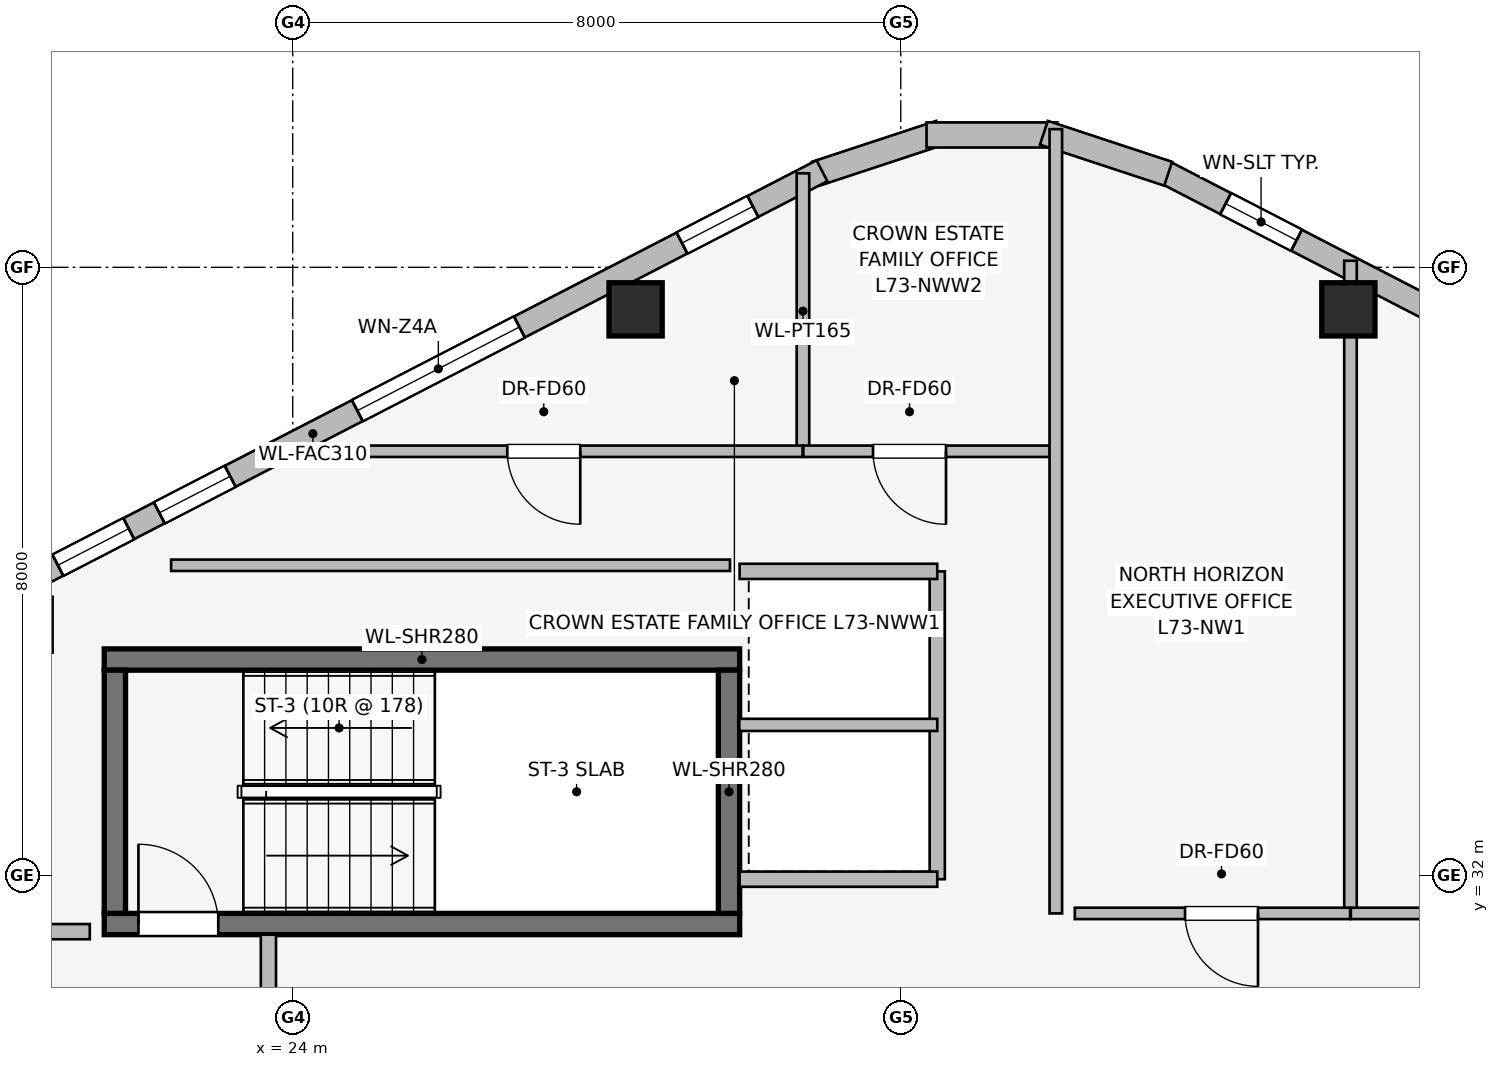
"""IFC4 building model, lengths in metres.
Left out: names, types, materials, properties, quantities, classifications, styles, units other than length and angle.
Written with IfcOpenShell. Run it as: python <this file> out.ifc"""

import sys

from ifc_helpers import new_model, si_unit, direction, frame, frame_2d, origin, origin_2d, place, context, subcontext, project, spatial, rectangle, extrude, element, fill, save


model = new_model("IFC4")
c1 = context("Model", 3, precision=1e-05, world=origin(), true_north=direction((0.0, 1.0)))
c2 = subcontext(c1, "Body", "Model", "MODEL_VIEW")
j1 = project(units=[si_unit("LENGTHUNIT", "METRE"), si_unit("PLANEANGLEUNIT", "RADIAN")], contexts=[c1])
p1 = place(None, origin())
s1 = spatial("IfcSite", under=j1, at=p1, CompositionType="ELEMENT")
p2 = place(p1, origin())
s2 = spatial("IfcBuilding", under=s1, at=p2, CompositionType="ELEMENT")
p3 = place(p2, frame((0.0, 0.0, 266.75)))
s3 = spatial("IfcBuildingStorey", under=s2, at=p3, CompositionType="ELEMENT", Elevation=266.75)
p4 = place(p3, frame((21.52, 31.36, 0.0), z_axis=(0.0, 0.0, 1.0), x_axis=(1.0, 0.0, 0.0)))
e1 = element("IfcWall", 1, at=p4, inside=s3, PredefinedType="SHEAR", context=c2, shape_type="SweptSolid", body=[
    extrude(rectangle(XDim=8.36, YDim=0.28, at=frame_2d((4.18, 0.0))), origin(), (0.0, 0.0, 1.0), 3.55),
])
p5 = place(p4, frame((0.45, 0.0, 0.0)))
e2 = element("IfcOpeningElement", 2, at=p5, cuts=e1, PredefinedType="OPENING", context=c2, shape_type="SweptSolid", body=[
    extrude(rectangle(XDim=1.05, YDim=2.0, at=frame_2d((0.525, 1.0))), frame((0.0, 0.15, 0.0), z_axis=(0.0, -1.0, 0.0), x_axis=(1.0, 0.0, 0.0)), (0.0, 0.0, 1.0), 0.3),
])
p6 = place(p3, frame((29.88, 34.84, 0.0), z_axis=(0.0, 0.0, 1.0), x_axis=(-1.0, 0.0, 0.0)))
e3 = element("IfcWall", 3, at=p6, inside=s3, PredefinedType="SHEAR", context=c2, shape_type="SweptSolid", body=[
    extrude(rectangle(XDim=8.36, YDim=0.28, at=frame_2d((4.18, 0.0))), origin(), (0.0, 0.0, 1.0), 3.55),
])
for number, where, z_axis, x_axis in (
    (4, (21.66, 34.7, 0.0), (0.0, 0.0, 1.0), (0.0, -1.0, 0.0)),
    (5, (29.74, 31.5, 0.0), (0.0, 0.0, 1.0), (0.0, 1.0, 0.0)),
):
    element("IfcWall", number, at=place(p3, frame(where, z_axis=z_axis, x_axis=x_axis)), inside=s3, PredefinedType="SHEAR", context=c2, shape_type="SweptSolid", body=[
        extrude(rectangle(XDim=3.2, YDim=0.28, at=frame_2d((1.6, 0.0))), origin(), (0.0, 0.0, 1.0), 3.55),
    ])
for number, where, z_axis, x_axis in (
    (6, (37.889, 39.447, 0.0), (0.0, 0.0, 1.0), (1.0, 0.0, 0.0)),
    (7, (28.511, 39.447, 0.0), (0.0, 0.0, 1.0), (1.0, 0.0, 0.0)),
):
    element("IfcColumn", number, at=place(p3, frame(where, z_axis=z_axis, x_axis=x_axis)), inside=s3, PredefinedType="COLUMN", context=c2, shape_type="SweptSolid", body=[
        extrude(rectangle(XDim=0.7, YDim=0.7, at=origin_2d()), origin(), (0.0, 0.0, 1.0), 3.55),
    ])
p7 = place(p3, frame((35.437, 41.27, 0.0), z_axis=(0.0, 0.0, 1.0), x_axis=(0.888581481622, -0.458718814218, 0.0)))
e8 = element("IfcWall", 8, at=p7, inside=s3, PredefinedType="STANDARD", context=c2, shape_type="SweptSolid", body=[
    extrude(rectangle(XDim=15.077, YDim=0.31, at=frame_2d((7.539, 0.0))), origin(), (0.0, 0.0, 1.0), 3.24),
])
p8 = place(p7, frame((0.942, 0.0, 0.75)))
e9 = element("IfcOpeningElement", 9, at=p8, cuts=e8, PredefinedType="OPENING", context=c2, shape_type="SweptSolid", body=[
    extrude(rectangle(XDim=1.05, YDim=1.4, at=frame_2d((0.525, 0.7))), frame((0.0, 0.165, 0.0), z_axis=(0.0, -1.0, 0.0), x_axis=(1.0, 0.0, 0.0)), (0.0, 0.0, 1.0), 0.33),
])
p9 = place(p7, frame((4.344, 0.0, 0.75)))
e10 = element("IfcOpeningElement", 10, at=p9, cuts=e8, PredefinedType="OPENING", context=c2, shape_type="SweptSolid", body=[
    extrude(rectangle(XDim=1.05, YDim=1.4, at=frame_2d((0.525, 0.7))), frame((0.0, 0.165, 0.0), z_axis=(0.0, -1.0, 0.0), x_axis=(1.0, 0.0, 0.0)), (0.0, 0.0, 1.0), 0.33),
])
p10 = place(p7, frame((7.013, 0.0, 0.75)))
e11 = element("IfcOpeningElement", 11, at=p10, cuts=e8, PredefinedType="OPENING", context=c2, shape_type="SweptSolid", body=[
    extrude(rectangle(XDim=1.05, YDim=1.4, at=frame_2d((0.525, 0.7))), frame((0.0, 0.165, 0.0), z_axis=(0.0, -1.0, 0.0), x_axis=(1.0, 0.0, 0.0)), (0.0, 0.0, 1.0), 0.33),
])
p11 = place(p7, frame((9.681, 0.0, 0.75)))
e12 = element("IfcOpeningElement", 12, at=p11, cuts=e8, PredefinedType="OPENING", context=c2, shape_type="SweptSolid", body=[
    extrude(rectangle(XDim=1.05, YDim=1.4, at=frame_2d((0.525, 0.7))), frame((0.0, 0.165, 0.0), z_axis=(0.0, -1.0, 0.0), x_axis=(1.0, 0.0, 0.0)), (0.0, 0.0, 1.0), 0.33),
])
p12 = place(p7, frame((13.029, 0.0, 0.75)))
e13 = element("IfcOpeningElement", 13, at=p12, cuts=e8, PredefinedType="OPENING", context=c2, shape_type="SweptSolid", body=[
    extrude(rectangle(XDim=1.05, YDim=1.4, at=frame_2d((0.525, 0.7))), frame((0.0, 0.165, 0.0), z_axis=(0.0, -1.0, 0.0), x_axis=(1.0, 0.0, 0.0)), (0.0, 0.0, 1.0), 0.33),
])
p13 = place(p3, frame((30.882, 41.231, 0.0), z_axis=(0.0, 0.0, 1.0), x_axis=(0.949713440491, 0.313120393699, 0.0)))
e14 = element("IfcWall", 14, at=p13, inside=s3, PredefinedType="STANDARD", context=c2, shape_type="SweptSolid", body=[
    extrude(rectangle(XDim=1.722, YDim=0.33, at=frame_2d((0.861, 0.0))), origin(), (0.0, 0.0, 1.0), 3.24),
])
p14 = place(p3, frame((32.339, 41.741, 0.0), z_axis=(0.0, 0.0, 1.0), x_axis=(1.0, 0.0, 0.0)))
e15 = element("IfcWall", 15, at=p14, inside=s3, PredefinedType="STANDARD", context=c2, shape_type="SweptSolid", body=[
    extrude(rectangle(XDim=1.722, YDim=0.33, at=frame_2d((0.861, 0.0))), origin(), (0.0, 0.0, 1.0), 3.24),
])
p15 = place(p3, frame((33.883, 41.77, 0.0), z_axis=(0.0, 0.0, 1.0), x_axis=(0.949713440491, -0.313120393699, 0.0)))
e16 = element("IfcWall", 16, at=p15, inside=s3, PredefinedType="STANDARD", context=c2, shape_type="SweptSolid", body=[
    extrude(rectangle(XDim=1.722, YDim=0.33, at=frame_2d((0.861, 0.0))), origin(), (0.0, 0.0, 1.0), 3.24),
])
p16 = place(p3, frame((17.566, 34.354, 0.0), z_axis=(0.0, 0.0, 1.0), x_axis=(0.888581481622, 0.458718814218, 0.0)))
e17 = element("IfcWall", 17, at=p16, inside=s3, PredefinedType="STANDARD", context=c2, shape_type="SweptSolid", body=[
    extrude(rectangle(XDim=15.077, YDim=0.31, at=frame_2d((7.539, 0.0))), origin(), (0.0, 0.0, 1.0), 3.24),
])
p17 = place(p16, frame((0.998, 0.0, 0.75)))
e18 = element("IfcOpeningElement", 18, at=p17, cuts=e17, PredefinedType="OPENING", context=c2, shape_type="SweptSolid", body=[
    extrude(rectangle(XDim=1.05, YDim=1.4, at=frame_2d((0.525, 0.7))), frame((0.0, 0.165, 0.0), z_axis=(0.0, -1.0, 0.0), x_axis=(1.0, 0.0, 0.0)), (0.0, 0.0, 1.0), 0.33),
])
p18 = place(p16, frame((3.763, 0.0, 0.75)))
e19 = element("IfcOpeningElement", 19, at=p18, cuts=e17, PredefinedType="OPENING", context=c2, shape_type="SweptSolid", body=[
    extrude(rectangle(XDim=1.05, YDim=1.4, at=frame_2d((0.525, 0.7))), frame((0.0, 0.165, 0.0), z_axis=(0.0, -1.0, 0.0), x_axis=(1.0, 0.0, 0.0)), (0.0, 0.0, 1.0), 0.33),
])
p19 = place(p16, frame((5.265, 0.0, 0.75)))
e20 = element("IfcOpeningElement", 20, at=p19, cuts=e17, PredefinedType="OPENING", context=c2, shape_type="SweptSolid", body=[
    extrude(rectangle(XDim=1.05, YDim=1.4, at=frame_2d((0.525, 0.7))), frame((0.0, 0.165, 0.0), z_axis=(0.0, -1.0, 0.0), x_axis=(1.0, 0.0, 0.0)), (0.0, 0.0, 1.0), 0.33),
])
p20 = place(p16, frame((8.197, 0.0, 0.75)))
e21 = element("IfcOpeningElement", 21, at=p20, cuts=e17, PredefinedType="OPENING", context=c2, shape_type="SweptSolid", body=[
    extrude(rectangle(XDim=2.4, YDim=1.6, at=frame_2d((1.2, 0.8))), frame((0.0, 0.165, 0.0), z_axis=(0.0, -1.0, 0.0), x_axis=(1.0, 0.0, 0.0)), (0.0, 0.0, 1.0), 0.33),
])
p21 = place(p16, frame((13.004, 0.0, 0.75)))
e22 = element("IfcOpeningElement", 22, at=p21, cuts=e17, PredefinedType="OPENING", context=c2, shape_type="SweptSolid", body=[
    extrude(rectangle(XDim=1.05, YDim=1.4, at=frame_2d((0.525, 0.7))), frame((0.0, 0.165, 0.0), z_axis=(0.0, -1.0, 0.0), x_axis=(1.0, 0.0, 0.0)), (0.0, 0.0, 1.0), 0.33),
])
p22 = place(p3, frame((23.68, 25.68, 0.0), z_axis=(0.0, 0.0, 1.0), x_axis=(0.0, 1.0, 0.0)))
e23 = element("IfcWall", 23, at=p22, inside=s3, PredefinedType="PARTITIONING", context=c2, shape_type="SweptSolid", body=[
    extrude(rectangle(XDim=5.54, YDim=0.2, at=frame_2d((2.77, 0.0))), origin(), (0.0, 0.0, 1.0), 3.24),
])
p23 = place(p22, frame((1.8, 0.0, 0.0)))
e24 = element("IfcOpeningElement", 24, at=p23, cuts=e23, PredefinedType="OPENING", context=c2, shape_type="SweptSolid", body=[
    extrude(rectangle(XDim=1.05, YDim=2.0, at=frame_2d((0.525, 1.0))), frame((0.0, 0.11, 0.0), z_axis=(0.0, -1.0, 0.0), x_axis=(1.0, 0.0, 0.0)), (0.0, 0.0, 1.0), 0.22),
])
p24 = place(p3, frame((21.33, 31.26, 0.0), z_axis=(0.0, 0.0, 1.0), x_axis=(-1.0, 0.0, 0.0)))
e25 = element("IfcWall", 25, at=p24, inside=s3, PredefinedType="PARTITIONING", context=c2, shape_type="SweptSolid", body=[
    extrude(rectangle(XDim=1.68, YDim=0.2, at=frame_2d((0.84, 0.0))), origin(), (0.0, 0.0, 1.0), 3.24),
])
p25 = place(p3, frame((32.48, 31.95, 0.0), z_axis=(0.0, 0.0, 1.0), x_axis=(0.0, 1.0, 0.0)))
e26 = element("IfcWall", 26, at=p25, inside=s3, PredefinedType="PARTITIONING", context=c2, shape_type="SweptSolid", body=[
    extrude(rectangle(XDim=4.05, YDim=0.2, at=frame_2d((2.025, 0.0))), origin(), (0.0, 0.0, 1.0), 3.24),
])
for number, where, z_axis, x_axis in (
    (27, (29.88, 36.0, 0.0), (0.0, 0.0, 1.0), (1.0, 0.0, 0.0)),
    (28, (32.48, 31.95, 0.0), (0.0, 0.0, 1.0), (-1.0, 0.0, 0.0)),
):
    element("IfcWall", number, at=place(p3, frame(where, z_axis=z_axis, x_axis=x_axis)), inside=s3, PredefinedType="PARTITIONING", context=c2, shape_type="SweptSolid", body=[
        extrude(rectangle(XDim=2.6, YDim=0.2, at=frame_2d((1.3, 0.0))), origin(), (0.0, 0.0, 1.0), 3.24),
    ])
p26 = place(p3, frame((29.875, 33.98, 0.0), z_axis=(0.0, 0.0, 1.0), x_axis=(1.0, 0.0, 0.0)))
e29 = element("IfcWall", 29, at=p26, inside=s3, PredefinedType="PARTITIONING", context=c2, shape_type="SweptSolid", body=[
    extrude(rectangle(XDim=2.605, YDim=0.16, at=frame_2d((1.302, 0.0))), origin(), (0.0, 0.0, 1.0), 3.24),
])
p27 = place(p3, frame((30.713, 37.61, 0.0), z_axis=(0.0, 0.0, 1.0), x_axis=(0.0, 1.0, 0.0)))
e30 = element("IfcWall", 30, at=p27, inside=s3, PredefinedType="PARTITIONING", context=c2, shape_type="SweptSolid", body=[
    extrude(rectangle(XDim=3.627, YDim=0.165, at=frame_2d((1.813, 0.0))), origin(), (0.0, 0.0, 1.0), 3.24),
])
p28 = place(p3, frame((30.708, 37.58, 0.0), z_axis=(0.0, 0.0, 1.0), x_axis=(-1.0, 0.0, 0.0)))
e31 = element("IfcWall", 31, at=p28, inside=s3, PredefinedType="PARTITIONING", context=c2, shape_type="SweptSolid", body=[
    extrude(rectangle(XDim=7.046, YDim=0.15, at=frame_2d((3.523, 0.0))), origin(), (0.0, 0.0, 1.0), 2.632),
])
p29 = place(p28, frame((2.925, 0.0, 0.0)))
e32 = element("IfcOpeningElement", 32, at=p29, cuts=e31, PredefinedType="OPENING", context=c2, shape_type="SweptSolid", body=[
    extrude(rectangle(XDim=0.96, YDim=2.0, at=frame_2d((0.48, 1.0))), frame((0.0, 0.085, 0.0), z_axis=(0.0, -1.0, 0.0), x_axis=(1.0, 0.0, 0.0)), (0.0, 0.0, 1.0), 0.17),
])
p30 = place(p3, frame((33.962, 37.58, 0.0), z_axis=(0.0, 0.0, 1.0), x_axis=(-1.0, 0.0, 0.0)))
e33 = element("IfcWall", 33, at=p30, inside=s3, PredefinedType="PARTITIONING", context=c2, shape_type="SweptSolid", body=[
    extrude(rectangle(XDim=3.244, YDim=0.15, at=frame_2d((1.622, 0.0))), origin(), (0.0, 0.0, 1.0), 3.24),
])
p31 = place(p30, frame((1.367, 0.0, 0.0)))
e34 = element("IfcOpeningElement", 34, at=p31, cuts=e33, PredefinedType="OPENING", context=c2, shape_type="SweptSolid", body=[
    extrude(rectangle(XDim=0.96, YDim=2.0, at=frame_2d((0.48, 1.0))), frame((0.0, 0.085, 0.0), z_axis=(0.0, -1.0, 0.0), x_axis=(1.0, 0.0, 0.0)), (0.0, 0.0, 1.0), 0.17),
])
p32 = place(p3, frame((34.04, 31.5, 0.0), z_axis=(0.0, 0.0, 1.0), x_axis=(0.0, 1.0, 0.0)))
e35 = element("IfcWall", 35, at=p32, inside=s3, PredefinedType="PARTITIONING", context=c2, shape_type="SweptSolid", body=[
    extrude(rectangle(XDim=10.318, YDim=0.165, at=frame_2d((5.159, 0.0))), origin(), (0.0, 0.0, 1.0), 3.24),
])
p33 = place(p3, frame((37.917, 31.51, 0.0), z_axis=(0.0, 0.0, 1.0), x_axis=(0.0, 1.0, 0.0)))
e36 = element("IfcWall", 36, at=p33, inside=s3, PredefinedType="PARTITIONING", context=c2, shape_type="SweptSolid", body=[
    extrude(rectangle(XDim=8.576, YDim=0.165, at=frame_2d((4.288, 0.0))), origin(), (0.0, 0.0, 1.0), 2.629),
])
p34 = place(p3, frame((37.912, 31.5, 0.0), z_axis=(0.0, 0.0, 1.0), x_axis=(-1.0, 0.0, 0.0)))
e37 = element("IfcWall", 37, at=p34, inside=s3, PredefinedType="PARTITIONING", context=c2, shape_type="SweptSolid", body=[
    extrude(rectangle(XDim=3.622, YDim=0.15, at=frame_2d((1.811, 0.0))), origin(), (0.0, 0.0, 1.0), 3.24),
])
p35 = place(p34, frame((1.212, 0.0, 0.0)))
e38 = element("IfcOpeningElement", 38, at=p35, cuts=e37, PredefinedType="OPENING", context=c2, shape_type="SweptSolid", body=[
    extrude(rectangle(XDim=0.96, YDim=2.0, at=frame_2d((0.48, 1.0))), frame((0.0, 0.085, 0.0), z_axis=(0.0, -1.0, 0.0), x_axis=(1.0, 0.0, 0.0)), (0.0, 0.0, 1.0), 0.17),
])
p36 = place(p3, frame((41.45, 31.5, 0.0), z_axis=(0.0, 0.0, 1.0), x_axis=(-1.0, 0.0, 0.0)))
e39 = element("IfcWall", 39, at=p36, inside=s3, PredefinedType="PARTITIONING", context=c2, shape_type="SweptSolid", body=[
    extrude(rectangle(XDim=3.528, YDim=0.15, at=frame_2d((1.764, 0.0))), origin(), (0.0, 0.0, 1.0), 3.24),
])
p37 = place(p36, frame((1.524, 0.0, 0.0)))
e40 = element("IfcOpeningElement", 40, at=p37, cuts=e39, PredefinedType="OPENING", context=c2, shape_type="SweptSolid", body=[
    extrude(rectangle(XDim=0.96, YDim=2.0, at=frame_2d((0.48, 1.0))), frame((0.0, 0.085, 0.0), z_axis=(0.0, -1.0, 0.0), x_axis=(1.0, 0.0, 0.0)), (0.0, 0.0, 1.0), 0.17),
])
p38 = place(p3, frame((29.753, 36.08, 0.0), z_axis=(0.0, 0.0, 1.0), x_axis=(-1.0, 0.0, 0.0)))
e41 = element("IfcWall", 41, at=p38, inside=s3, PredefinedType="PARTITIONING", context=c2, shape_type="SweptSolid", body=[
    extrude(rectangle(XDim=7.353, YDim=0.15, at=frame_2d((3.677, 0.0))), origin(), (0.0, 0.0, 1.0), 2.632),
])
p39 = place(p8, origin())
e42 = element("IfcWindow", 42, at=p39, inside=s3, PartitioningType="SINGLE_PANEL", PredefinedType="WINDOW", context=c2, shape_type="SweptSolid", body=[
    extrude(rectangle(XDim=1.05, YDim=1.4, at=frame_2d((0.525, 0.7))), frame((0.0, 0.03, 0.0), z_axis=(0.0, -1.0, 0.0), x_axis=(1.0, 0.0, 0.0)), (0.0, 0.0, 1.0), 0.06),
])
fill(e9, e42)
p40 = place(p18, origin())
e43 = element("IfcWindow", 43, at=p40, inside=s3, PartitioningType="SINGLE_PANEL", PredefinedType="WINDOW", context=c2, shape_type="SweptSolid", body=[
    extrude(rectangle(XDim=1.05, YDim=1.4, at=frame_2d((0.525, 0.7))), frame((0.0, 0.03, 0.0), z_axis=(0.0, -1.0, 0.0), x_axis=(1.0, 0.0, 0.0)), (0.0, 0.0, 1.0), 0.06),
])
fill(e19, e43)
p41 = place(p19, origin())
e44 = element("IfcWindow", 44, at=p41, inside=s3, PartitioningType="SINGLE_PANEL", PredefinedType="WINDOW", context=c2, shape_type="SweptSolid", body=[
    extrude(rectangle(XDim=1.05, YDim=1.4, at=frame_2d((0.525, 0.7))), frame((0.0, 0.03, 0.0), z_axis=(0.0, -1.0, 0.0), x_axis=(1.0, 0.0, 0.0)), (0.0, 0.0, 1.0), 0.06),
])
fill(e20, e44)
p42 = place(p20, origin())
e45 = element("IfcWindow", 45, at=p42, inside=s3, PartitioningType="SINGLE_PANEL", PredefinedType="WINDOW", context=c2, shape_type="SweptSolid", body=[
    extrude(rectangle(XDim=2.4, YDim=1.6, at=frame_2d((1.2, 0.8))), frame((0.0, 0.03, 0.0), z_axis=(0.0, -1.0, 0.0), x_axis=(1.0, 0.0, 0.0)), (0.0, 0.0, 1.0), 0.06),
])
fill(e21, e45)
p43 = place(p21, origin())
e46 = element("IfcWindow", 46, at=p43, inside=s3, PartitioningType="SINGLE_PANEL", PredefinedType="WINDOW", context=c2, shape_type="SweptSolid", body=[
    extrude(rectangle(XDim=1.05, YDim=1.4, at=frame_2d((0.525, 0.7))), frame((0.0, 0.03, 0.0), z_axis=(0.0, -1.0, 0.0), x_axis=(1.0, 0.0, 0.0)), (0.0, 0.0, 1.0), 0.06),
])
fill(e22, e46)
p44 = place(p5, origin())
e47 = element("IfcDoor", 47, at=p44, inside=s3, OperationType="SINGLE_SWING_LEFT", PredefinedType="DOOR", context=c2, shape_type="SweptSolid", body=[
    extrude(rectangle(XDim=1.05, YDim=2.0, at=frame_2d((0.525, 1.0))), frame((0.0, 0.025, 0.0), z_axis=(0.0, -1.0, 0.0), x_axis=(1.0, 0.0, 0.0)), (0.0, 0.0, 1.0), 0.05),
])
fill(e2, e47)
p45 = place(p29, origin())
e48 = element("IfcDoor", 48, at=p45, inside=s3, OperationType="SINGLE_SWING_LEFT", PredefinedType="DOOR", context=c2, shape_type="SweptSolid", body=[
    extrude(rectangle(XDim=0.96, YDim=2.0, at=frame_2d((0.48, 1.0))), frame((0.0, 0.025, 0.0), z_axis=(0.0, -1.0, 0.0), x_axis=(1.0, 0.0, 0.0)), (0.0, 0.0, 1.0), 0.05),
])
fill(e32, e48)
p46 = place(p31, origin())
e49 = element("IfcDoor", 49, at=p46, inside=s3, OperationType="SINGLE_SWING_LEFT", PredefinedType="DOOR", context=c2, shape_type="SweptSolid", body=[
    extrude(rectangle(XDim=0.96, YDim=2.0, at=frame_2d((0.48, 1.0))), frame((0.0, 0.025, 0.0), z_axis=(0.0, -1.0, 0.0), x_axis=(1.0, 0.0, 0.0)), (0.0, 0.0, 1.0), 0.05),
])
fill(e34, e49)
p47 = place(p35, origin())
e50 = element("IfcDoor", 50, at=p47, inside=s3, OperationType="SINGLE_SWING_LEFT", PredefinedType="DOOR", context=c2, shape_type="SweptSolid", body=[
    extrude(rectangle(XDim=0.96, YDim=2.0, at=frame_2d((0.48, 1.0))), frame((0.0, 0.025, 0.0), z_axis=(0.0, -1.0, 0.0), x_axis=(1.0, 0.0, 0.0)), (0.0, 0.0, 1.0), 0.05),
])
fill(e38, e50)
save(model, sys.argv[1])
